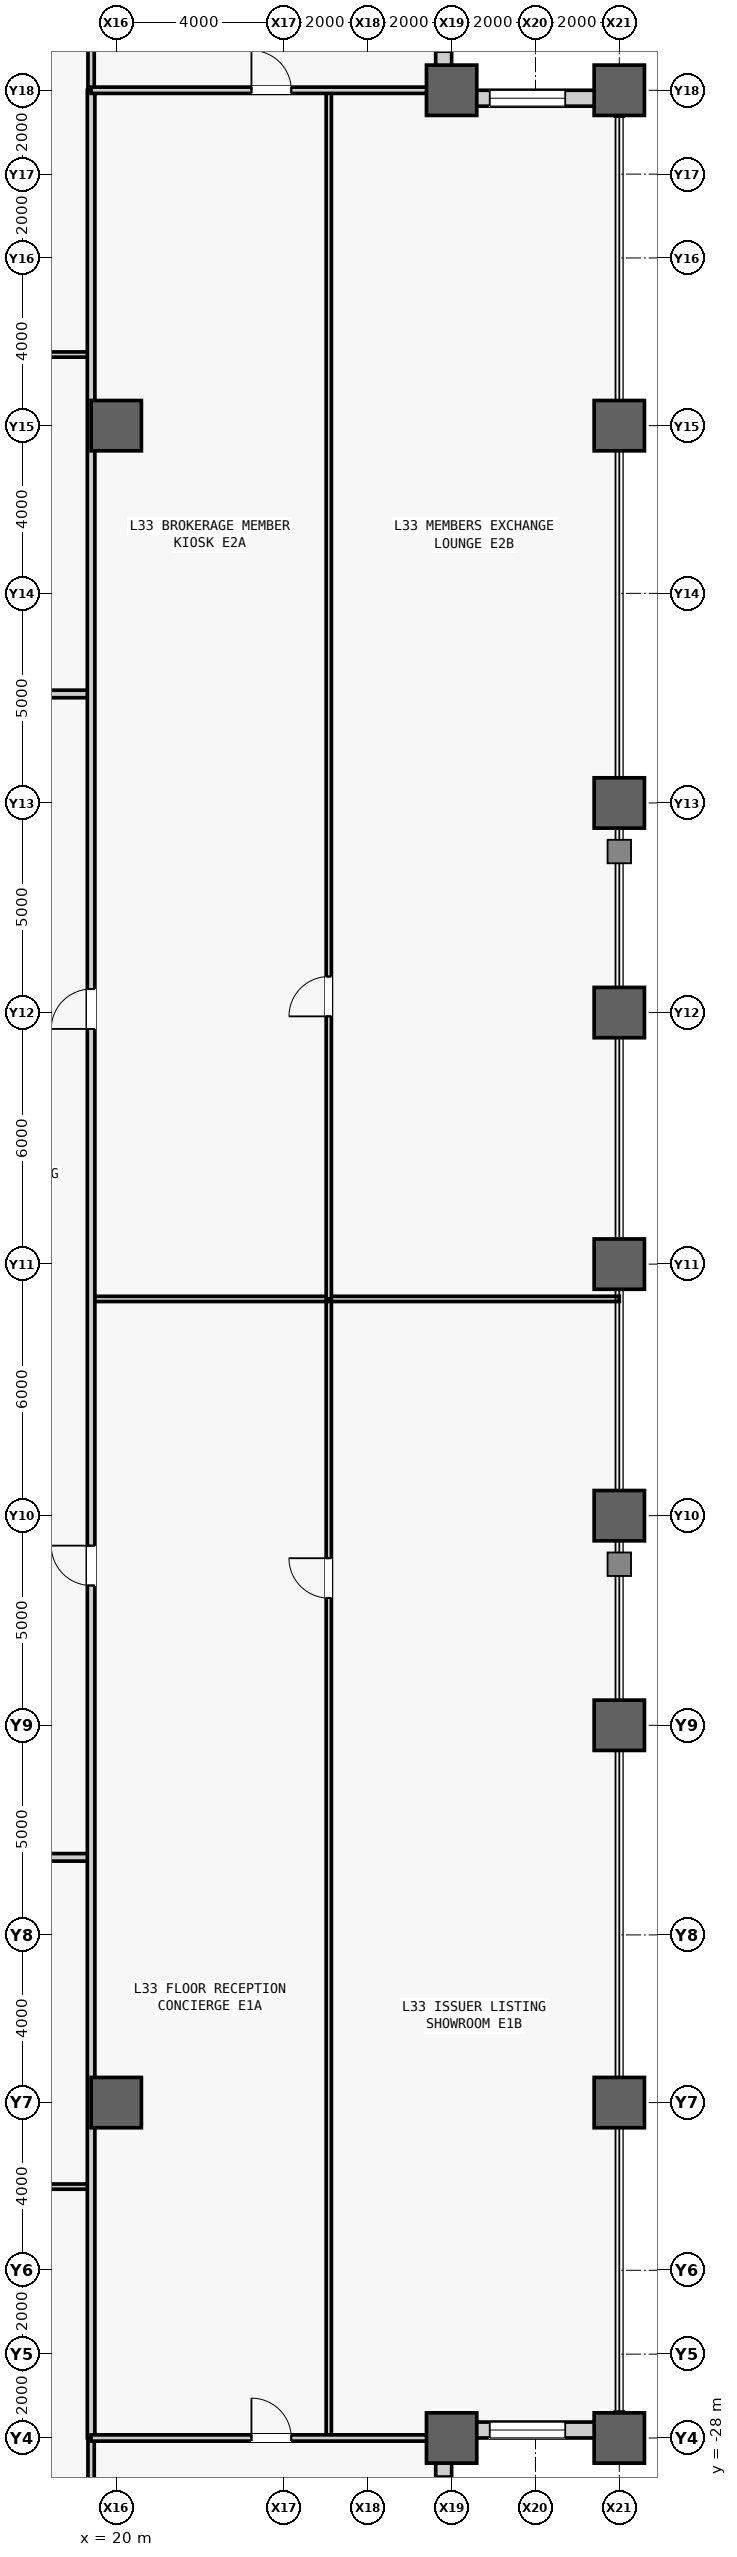
"""IFC4 building model, lengths in metres.
Left out: names, types, materials, properties, quantities, classifications, styles, units other than length and angle.
Written with IfcOpenShell. Run it as: python <this file> out.ifc"""

import sys

from ifc_helpers import new_model, si_unit, direction, frame, frame_2d, origin, origin_2d, place, context, subcontext, project, spatial, rectangle, hollow_rectangle, extrude, source, transform, mapped, element, fill, save


model = new_model("IFC4")
c1 = context("Model", 3, precision=1e-05, world=origin(), true_north=direction((0.0, 1.0)))
c2 = subcontext(c1, "Body", "Model", "MODEL_VIEW")
j1 = project(units=[si_unit("LENGTHUNIT", "METRE"), si_unit("PLANEANGLEUNIT", "RADIAN")], contexts=[c1])
p1 = place(None, origin())
s1 = spatial("IfcSite", under=j1, at=p1, CompositionType="ELEMENT")
p2 = place(p1, origin())
s2 = spatial("IfcBuilding", under=s1, at=p2, CompositionType="ELEMENT")
p3 = place(p2, frame((0.0, 0.0, 144.7)))
s3 = spatial("IfcBuildingStorey", under=s2, at=p3, CompositionType="ELEMENT", Elevation=144.7)
m1 = source(origin(), c2, "Body", "SweptSolid", [
    extrude(hollow_rectangle(XDim=1.2, YDim=1.2, WallThickness=0.07, at=origin_2d()), origin(), (0.0, 0.0, 1.0), 5.2),
])
for number, where, z_axis, x_axis in (
    (1, (20.0, -20.0, 0.0), (0.0, 0.0, 1.0), (1.0, 0.0, 0.0)),
    (2, (20.0, 20.0, 0.0), (0.0, 0.0, 1.0), (1.0, 0.0, 0.0)),
    (3, (28.0, -28.0, 0.0), (0.0, 0.0, 1.0), (1.0, 0.0, 0.0)),
    (4, (28.0, 28.0, 0.0), (0.0, 0.0, 1.0), (1.0, 0.0, 0.0)),
    (5, (32.0, -28.0, 0.0), (0.0, 0.0, 1.0), (1.0, 0.0, 0.0)),
    (6, (32.0, -20.0, 0.0), (0.0, 0.0, 1.0), (1.0, 0.0, 0.0)),
    (7, (32.0, -11.0, 0.0), (0.0, 0.0, 1.0), (1.0, 0.0, 0.0)),
    (8, (32.0, -6.0, 0.0), (0.0, 0.0, 1.0), (1.0, 0.0, 0.0)),
    (9, (32.0, 0.0, 0.0), (0.0, 0.0, 1.0), (1.0, 0.0, 0.0)),
    (10, (32.0, 6.0, 0.0), (0.0, 0.0, 1.0), (1.0, 0.0, 0.0)),
    (11, (32.0, 11.0, 0.0), (0.0, 0.0, 1.0), (1.0, 0.0, 0.0)),
    (12, (32.0, 20.0, 0.0), (0.0, 0.0, 1.0), (1.0, 0.0, 0.0)),
    (13, (32.0, 28.0, 0.0), (0.0, 0.0, 1.0), (1.0, 0.0, 0.0)),
):
    element("IfcColumn", number, at=place(p3, frame(where, z_axis=z_axis, x_axis=x_axis)), inside=s3, PredefinedType="COLUMN", context=c2, shape_type="MappedRepresentation", body=[
        mapped(m1, transform((0.0, 0.0, 0.0), scale=1.0)),
    ])
m2 = source(origin(), c2, "Body", "SweptSolid", [
    extrude(rectangle(XDim=3.62, YDim=0.38, at=frame_2d((1.81, 0.0))), origin(), (0.0, 0.0, 1.0), 3.905),
])
p4 = place(p3, frame((27.81, -31.62, 0.0), z_axis=(0.0, 0.0, 1.0), x_axis=(0.0, 1.0, 0.0)))
e14 = element("IfcWall", 14, at=p4, inside=s3, PredefinedType="STANDARD", context=c2, shape_type="MappedRepresentation", body=[
    mapped(m2, transform((0.0, 0.0, 0.0), scale=1.0)),
])
m3 = source(origin(), c2, "Body", "SweptSolid", [
    extrude(rectangle(XDim=1.8, YDim=2.4, at=frame_2d((0.9, 1.2))), frame((0.0, 0.2, 0.0), z_axis=(0.0, -1.0, 0.0), x_axis=(1.0, 0.0, 0.0)), (0.0, 0.0, 1.0), 0.4),
])
p5 = place(p4, frame((0.91, 0.0, 0.7)))
e15 = element("IfcOpeningElement", 15, at=p5, cuts=e14, PredefinedType="OPENING", context=c2, shape_type="MappedRepresentation", body=[
    mapped(m3, transform((0.0, 0.0, 0.0), scale=1.0)),
])
p6 = place(p3, frame((28.0, -27.81, 0.0), z_axis=(0.0, 0.0, 1.0), x_axis=(1.0, 0.0, 0.0)))
e16 = element("IfcWall", 16, at=p6, inside=s3, PredefinedType="STANDARD", context=c2, shape_type="MappedRepresentation", body=[
    mapped(m2, transform((0.0, 0.0, 0.0), scale=1.0)),
])
p7 = place(p6, frame((0.91, 0.0, 0.7)))
e17 = element("IfcOpeningElement", 17, at=p7, cuts=e16, PredefinedType="OPENING", context=c2, shape_type="MappedRepresentation", body=[
    mapped(m3, transform((0.0, 0.0, 0.0), scale=1.0)),
])
p8 = place(p3, frame((28.0, 27.81, 0.0), z_axis=(0.0, 0.0, 1.0), x_axis=(1.0, 0.0, 0.0)))
e18 = element("IfcWall", 18, at=p8, inside=s3, PredefinedType="STANDARD", context=c2, shape_type="MappedRepresentation", body=[
    mapped(m2, transform((0.0, 0.0, 0.0), scale=1.0)),
])
p9 = place(p8, frame((0.91, 0.0, 0.7)))
e19 = element("IfcOpeningElement", 19, at=p9, cuts=e18, PredefinedType="OPENING", context=c2, shape_type="MappedRepresentation", body=[
    mapped(m3, transform((0.0, 0.0, 0.0), scale=1.0)),
])
p10 = place(p3, frame((27.81, 28.0, 0.0), z_axis=(0.0, 0.0, 1.0), x_axis=(0.0, 1.0, 0.0)))
e20 = element("IfcWall", 20, at=p10, inside=s3, PredefinedType="STANDARD", context=c2, shape_type="MappedRepresentation", body=[
    mapped(m2, transform((0.0, 0.0, 0.0), scale=1.0)),
])
p11 = place(p10, frame((0.91, 0.0, 0.7)))
e21 = element("IfcOpeningElement", 21, at=p11, cuts=e20, PredefinedType="OPENING", context=c2, shape_type="MappedRepresentation", body=[
    mapped(m3, transform((0.0, 0.0, 0.0), scale=1.0)),
])
m4 = source(origin(), c2, "Body", "SweptSolid", [
    extrude(rectangle(XDim=11.385, YDim=0.125, at=frame_2d((5.692, 0.0))), origin(), (0.0, 0.0, 1.0), 4.6),
])
p12 = place(p3, frame((8.015, -22.004, 0.0), z_axis=(0.0, 0.0, 1.0), x_axis=(1.0, 0.0, 0.0)))
e22 = element("IfcWall", 22, at=p12, inside=s3, PredefinedType="PARTITIONING", context=c2, shape_type="MappedRepresentation", body=[
    mapped(m4, transform((0.0, 0.0, 0.0), scale=1.0)),
])
m5 = source(origin(), c2, "Body", "SweptSolid", [
    extrude(rectangle(XDim=0.95, YDim=2.15, at=frame_2d((0.475, 1.075))), frame((0.0, 0.073, 0.0), z_axis=(0.0, -1.0, 0.0), x_axis=(1.0, 0.0, 0.0)), (0.0, 0.0, 1.0), 0.145),
])
p13 = place(p12, frame((5.218, 0.0, 0.0)))
e23 = element("IfcOpeningElement", 23, at=p13, cuts=e22, PredefinedType="OPENING", context=c2, shape_type="MappedRepresentation", body=[
    mapped(m5, transform((0.0, 0.0, 0.0), scale=1.0)),
])
m6 = source(origin(), c2, "Body", "SweptSolid", [
    extrude(rectangle(XDim=37.95, YDim=0.18, at=frame_2d((18.975, 0.0))), origin(), (0.0, 0.0, 1.0), 4.6),
])
p14 = place(p3, frame((-18.55, -14.15, 0.0), z_axis=(0.0, 0.0, 1.0), x_axis=(1.0, 0.0, 0.0)))
e24 = element("IfcWall", 24, at=p14, inside=s3, PredefinedType="PARTITIONING", context=c2, shape_type="MappedRepresentation", body=[
    mapped(m6, transform((0.0, 0.0, 0.0), scale=1.0)),
])
m7 = source(origin(), c2, "Body", "SweptSolid", [
    extrude(rectangle(XDim=1.05, YDim=2.2, at=frame_2d((0.525, 1.1))), frame((0.0, 0.1, 0.0), z_axis=(0.0, -1.0, 0.0), x_axis=(1.0, 0.0, 0.0)), (0.0, 0.0, 1.0), 0.2),
])
p15 = place(p14, frame((8.191, 0.0, 0.0)))
e25 = element("IfcOpeningElement", 25, at=p15, cuts=e24, PredefinedType="OPENING", context=c2, shape_type="MappedRepresentation", body=[
    mapped(m7, transform((0.0, 0.0, 0.0), scale=1.0)),
])
p16 = place(p14, frame((19.399, 0.0, 0.0)))
e26 = element("IfcOpeningElement", 26, at=p16, cuts=e24, PredefinedType="OPENING", context=c2, shape_type="MappedRepresentation", body=[
    mapped(m7, transform((0.0, 0.0, 0.0), scale=1.0)),
])
p17 = place(p14, frame((29.232, 0.0, 0.0)))
e27 = element("IfcOpeningElement", 27, at=p17, cuts=e24, PredefinedType="OPENING", context=c2, shape_type="MappedRepresentation", body=[
    mapped(m7, transform((0.0, 0.0, 0.0), scale=1.0)),
])
m8 = source(origin(), c2, "Body", "SweptSolid", [
    extrude(rectangle(XDim=12.903, YDim=0.125, at=frame_2d((6.451, 0.0))), origin(), (0.0, 0.0, 1.0), 4.6),
])
p18 = place(p3, frame((6.497, 21.696, 0.0), z_axis=(0.0, 0.0, 1.0), x_axis=(1.0, 0.0, 0.0)))
e28 = element("IfcWall", 28, at=p18, inside=s3, PredefinedType="PARTITIONING", context=c2, shape_type="MappedRepresentation", body=[
    mapped(m8, transform((0.0, 0.0, 0.0), scale=1.0)),
])
p19 = place(p18, frame((5.977, 0.0, 0.0)))
e29 = element("IfcOpeningElement", 29, at=p19, cuts=e28, PredefinedType="OPENING", context=c2, shape_type="MappedRepresentation", body=[
    mapped(m5, transform((0.0, 0.0, 0.0), scale=1.0)),
])
p20 = place(p3, frame((-18.55, 13.6, 0.0), z_axis=(0.0, 0.0, 1.0), x_axis=(1.0, 0.0, 0.0)))
e30 = element("IfcWall", 30, at=p20, inside=s3, PredefinedType="PARTITIONING", context=c2, shape_type="MappedRepresentation", body=[
    mapped(m6, transform((0.0, 0.0, 0.0), scale=1.0)),
])
p21 = place(p20, frame((7.622, 0.0, 0.0)))
e31 = element("IfcOpeningElement", 31, at=p21, cuts=e30, PredefinedType="OPENING", context=c2, shape_type="MappedRepresentation", body=[
    mapped(m7, transform((0.0, 0.0, 0.0), scale=1.0)),
])
p22 = place(p20, frame((18.071, 0.0, 0.0)))
e32 = element("IfcOpeningElement", 32, at=p22, cuts=e30, PredefinedType="OPENING", context=c2, shape_type="MappedRepresentation", body=[
    mapped(m7, transform((0.0, 0.0, 0.0), scale=1.0)),
])
p23 = place(p20, frame((28.473, 0.0, 0.0)))
e33 = element("IfcOpeningElement", 33, at=p23, cuts=e30, PredefinedType="OPENING", context=c2, shape_type="MappedRepresentation", body=[
    mapped(m7, transform((0.0, 0.0, 0.0), scale=1.0)),
])
m9 = source(origin(), c2, "Body", "SweptSolid", [
    extrude(rectangle(XDim=4.0, YDim=0.15, at=frame_2d((2.0, 0.0))), origin(), (0.0, 0.0, 1.0), 4.6),
])
for number, where, z_axis, x_axis in (
    (34, (19.4, -32.0, 0.0), (0.0, 0.0, 1.0), (0.0, 1.0, 0.0)),
    (35, (19.4, 28.0, 0.0), (0.0, 0.0, 1.0), (0.0, 1.0, 0.0)),
):
    element("IfcWall", number, at=place(p3, frame(where, z_axis=z_axis, x_axis=x_axis)), inside=s3, PredefinedType="PARTITIONING", context=c2, shape_type="MappedRepresentation", body=[
        mapped(m9, transform((0.0, 0.0, 0.0), scale=1.0)),
    ])
m10 = source(origin(), c2, "Body", "SweptSolid", [
    extrude(rectangle(XDim=27.17, YDim=0.125, at=frame_2d((13.585, 0.0))), origin(), (0.0, 0.0, 1.0), 2.8),
])
p24 = place(p3, frame((25.07, -28.0, 0.0), z_axis=(0.0, 0.0, 1.0), x_axis=(0.0, 1.0, 0.0)))
e36 = element("IfcWall", 36, at=p24, inside=s3, PredefinedType="PARTITIONING", context=c2, shape_type="MappedRepresentation", body=[
    mapped(m10, transform((0.0, 0.0, 0.0), scale=1.0)),
])
p25 = place(p24, frame((20.035, 0.0, 0.0)))
e37 = element("IfcOpeningElement", 37, at=p25, cuts=e36, PredefinedType="OPENING", context=c2, shape_type="MappedRepresentation", body=[
    mapped(m5, transform((0.0, 0.0, 0.0), scale=1.0)),
])
m11 = source(origin(), c2, "Body", "SweptSolid", [
    extrude(rectangle(XDim=12.6, YDim=0.125, at=frame_2d((6.3, 0.0))), origin(), (0.0, 0.0, 1.0), 4.6),
])
p26 = place(p3, frame((19.4, -0.83, 0.0), z_axis=(0.0, 0.0, 1.0), x_axis=(1.0, 0.0, 0.0)))
e38 = element("IfcWall", 38, at=p26, inside=s3, PredefinedType="PARTITIONING", context=c2, shape_type="MappedRepresentation", body=[
    mapped(m11, transform((0.0, 0.0, 0.0), scale=1.0)),
])
m12 = source(origin(), c2, "Body", "SweptSolid", [
    extrude(rectangle(XDim=28.83, YDim=0.125, at=frame_2d((14.415, 0.0))), origin(), (0.0, 0.0, 1.0), 2.8),
])
p27 = place(p3, frame((25.07, -0.83, 0.0), z_axis=(0.0, 0.0, 1.0), x_axis=(0.0, 1.0, 0.0)))
e39 = element("IfcWall", 39, at=p27, inside=s3, PredefinedType="PARTITIONING", context=c2, shape_type="MappedRepresentation", body=[
    mapped(m12, transform((0.0, 0.0, 0.0), scale=1.0)),
])
p28 = place(p27, frame((6.74, 0.0, 0.0)))
e40 = element("IfcOpeningElement", 40, at=p28, cuts=e39, PredefinedType="OPENING", context=c2, shape_type="MappedRepresentation", body=[
    mapped(m5, transform((0.0, 0.0, 0.0), scale=1.0)),
])
m13 = source(origin(), c2, "Body", "SweptSolid", [
    extrude(rectangle(XDim=56.0, YDim=0.18, at=frame_2d((28.0, 0.0))), origin(), (0.0, 0.0, 1.0), 4.131),
])
p29 = place(p3, frame((19.4, -28.0, 0.0), z_axis=(0.0, 0.0, 1.0), x_axis=(0.0, 1.0, 0.0)))
e41 = element("IfcWall", 41, at=p29, inside=s3, PredefinedType="PARTITIONING", context=c2, shape_type="MappedRepresentation", body=[
    mapped(m13, transform((0.0, 0.0, 0.0), scale=1.0)),
])
m14 = source(origin(), c2, "Body", "SweptSolid", [
    extrude(rectangle(XDim=0.95, YDim=2.15, at=frame_2d((0.475, 1.075))), frame((0.0, 0.1, 0.0), z_axis=(0.0, -1.0, 0.0), x_axis=(1.0, 0.0, 0.0)), (0.0, 0.0, 1.0), 0.2),
])
p30 = place(p29, frame((20.335, 0.0, 0.0)))
e42 = element("IfcOpeningElement", 42, at=p30, cuts=e41, PredefinedType="OPENING", context=c2, shape_type="MappedRepresentation", body=[
    mapped(m14, transform((0.0, 0.0, 0.0), scale=1.0)),
])
p31 = place(p29, frame((33.61, 0.0, 0.0)))
e43 = element("IfcOpeningElement", 43, at=p31, cuts=e41, PredefinedType="OPENING", context=c2, shape_type="MappedRepresentation", body=[
    mapped(m14, transform((0.0, 0.0, 0.0), scale=1.0)),
])
m15 = source(origin(), c2, "Body", "SweptSolid", [
    extrude(rectangle(XDim=8.6, YDim=0.15, at=frame_2d((4.3, 0.0))), origin(), (0.0, 0.0, 1.0), 4.6),
])
p32 = place(p3, frame((19.4, -28.0, 0.0), z_axis=(0.0, 0.0, 1.0), x_axis=(1.0, 0.0, 0.0)))
e44 = element("IfcWall", 44, at=p32, inside=s3, PredefinedType="PARTITIONING", context=c2, shape_type="MappedRepresentation", body=[
    mapped(m15, transform((0.0, 0.0, 0.0), scale=1.0)),
])
m16 = source(origin(), c2, "Body", "SweptSolid", [
    extrude(rectangle(XDim=0.95, YDim=2.15, at=frame_2d((0.475, 1.075))), frame((0.0, 0.085, 0.0), z_axis=(0.0, -1.0, 0.0), x_axis=(1.0, 0.0, 0.0)), (0.0, 0.0, 1.0), 0.17),
])
p33 = place(p32, frame((3.825, 0.0, 0.0)))
e45 = element("IfcOpeningElement", 45, at=p33, cuts=e44, PredefinedType="OPENING", context=c2, shape_type="MappedRepresentation", body=[
    mapped(m16, transform((0.0, 0.0, 0.0), scale=1.0)),
])
p34 = place(p3, frame((19.4, 28.0, 0.0), z_axis=(0.0, 0.0, 1.0), x_axis=(1.0, 0.0, 0.0)))
e46 = element("IfcWall", 46, at=p34, inside=s3, PredefinedType="PARTITIONING", context=c2, shape_type="MappedRepresentation", body=[
    mapped(m15, transform((0.0, 0.0, 0.0), scale=1.0)),
])
p35 = place(p34, frame((3.825, 0.0, 0.0)))
e47 = element("IfcOpeningElement", 47, at=p35, cuts=e46, PredefinedType="OPENING", context=c2, shape_type="MappedRepresentation", body=[
    mapped(m16, transform((0.0, 0.0, 0.0), scale=1.0)),
])
m17 = source(origin(), c2, "Body", "SweptSolid", [
    extrude(rectangle(XDim=1.8, YDim=2.4, at=frame_2d((0.9, 1.2))), frame((0.0, 0.03, 0.0), z_axis=(0.0, -1.0, 0.0), x_axis=(1.0, 0.0, 0.0)), (0.0, 0.0, 1.0), 0.06),
])
p36 = place(p5, origin())
e48 = element("IfcWindow", 48, at=p36, inside=s3, PartitioningType="SINGLE_PANEL", PredefinedType="WINDOW", context=c2, shape_type="MappedRepresentation", body=[
    mapped(m17, transform((0.0, 0.0, 0.0), scale=1.0)),
])
fill(e15, e48)
p37 = place(p7, origin())
e49 = element("IfcWindow", 49, at=p37, inside=s3, PartitioningType="SINGLE_PANEL", PredefinedType="WINDOW", context=c2, shape_type="MappedRepresentation", body=[
    mapped(m17, transform((0.0, 0.0, 0.0), scale=1.0)),
])
fill(e17, e49)
p38 = place(p9, origin())
e50 = element("IfcWindow", 50, at=p38, inside=s3, PartitioningType="SINGLE_PANEL", PredefinedType="WINDOW", context=c2, shape_type="MappedRepresentation", body=[
    mapped(m17, transform((0.0, 0.0, 0.0), scale=1.0)),
])
fill(e19, e50)
p39 = place(p11, origin())
e51 = element("IfcWindow", 51, at=p39, inside=s3, PartitioningType="SINGLE_PANEL", PredefinedType="WINDOW", context=c2, shape_type="MappedRepresentation", body=[
    mapped(m17, transform((0.0, 0.0, 0.0), scale=1.0)),
])
fill(e21, e51)
m18 = source(origin(), c2, "Body", "SweptSolid", [
    extrude(rectangle(XDim=0.95, YDim=2.15, at=frame_2d((0.475, 1.075))), frame((0.0, 0.025, 0.0), z_axis=(0.0, -1.0, 0.0), x_axis=(1.0, 0.0, 0.0)), (0.0, 0.0, 1.0), 0.05),
])
p40 = place(p25, origin())
e52 = element("IfcDoor", 52, at=p40, inside=s3, OperationType="SINGLE_SWING_RIGHT", PredefinedType="DOOR", context=c2, shape_type="MappedRepresentation", body=[
    mapped(m18, transform((0.0, 0.0, 0.0), scale=1.0)),
])
fill(e37, e52)
p41 = place(p28, origin())
e53 = element("IfcDoor", 53, at=p41, inside=s3, OperationType="SINGLE_SWING_LEFT", PredefinedType="DOOR", context=c2, shape_type="MappedRepresentation", body=[
    mapped(m18, transform((0.0, 0.0, 0.0), scale=1.0)),
])
fill(e40, e53)
p42 = place(p30, origin())
e54 = element("IfcDoor", 54, at=p42, inside=s3, OperationType="SINGLE_SWING_RIGHT", PredefinedType="DOOR", context=c2, shape_type="MappedRepresentation", body=[
    mapped(m18, transform((0.0, 0.0, 0.0), scale=1.0)),
])
fill(e42, e54)
p43 = place(p31, origin())
e55 = element("IfcDoor", 55, at=p43, inside=s3, OperationType="SINGLE_SWING_LEFT", PredefinedType="DOOR", context=c2, shape_type="MappedRepresentation", body=[
    mapped(m18, transform((0.0, 0.0, 0.0), scale=1.0)),
])
fill(e43, e55)
p44 = place(p33, origin())
e56 = element("IfcDoor", 56, at=p44, inside=s3, OperationType="SINGLE_SWING_LEFT", PredefinedType="DOOR", context=c2, shape_type="MappedRepresentation", body=[
    mapped(m18, transform((0.0, 0.0, 0.0), scale=1.0)),
])
fill(e45, e56)
p45 = place(p35, origin())
e57 = element("IfcDoor", 57, at=p45, inside=s3, OperationType="SINGLE_SWING_LEFT", PredefinedType="DOOR", context=c2, shape_type="MappedRepresentation", body=[
    mapped(m18, transform((0.0, 0.0, 0.0), scale=1.0)),
])
fill(e47, e57)
save(model, sys.argv[1])
